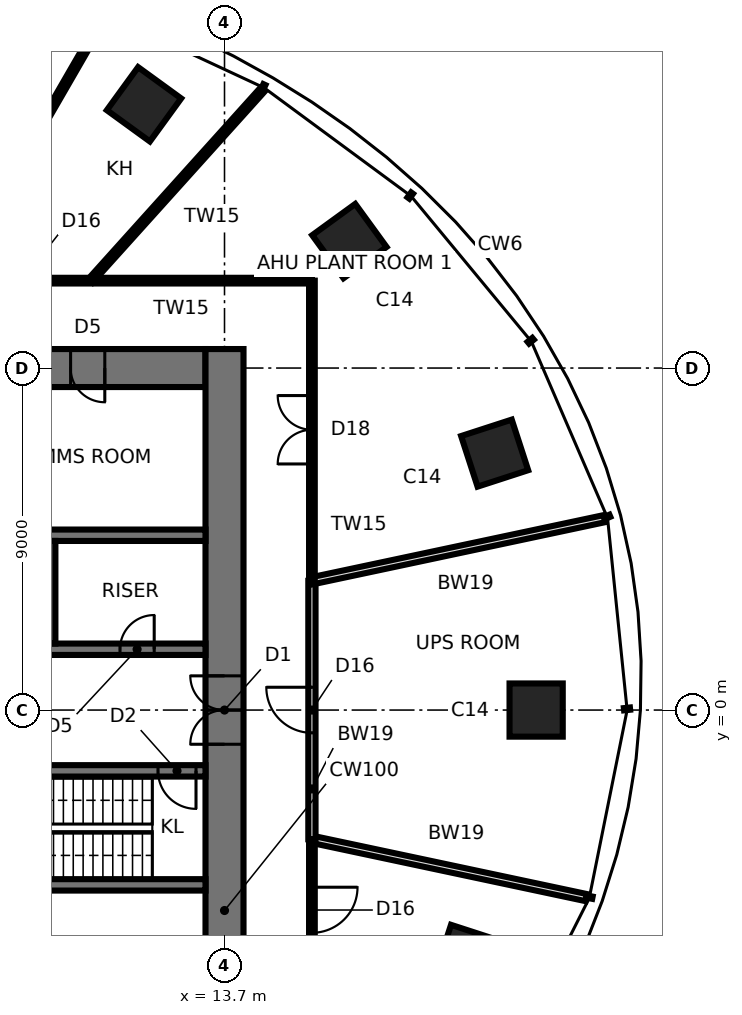
"""IFC4 building model, lengths in metres.
Left out: names, types, materials, properties, quantities, classifications, styles, units other than length and angle.
Written with IfcOpenShell. Run it as: python <this file> out.ifc"""

import sys

from ifc_helpers import new_model, si_unit, direction, frame, frame_2d, origin, origin_2d, place, context, subcontext, project, spatial, rectangle, extrude, element, fill, save


model = new_model("IFC4")
c1 = context("Model", 3, precision=1e-05, world=origin(), true_north=direction((0.0, 1.0)))
c2 = subcontext(c1, "Body", "Model", "MODEL_VIEW")
j1 = project(units=[si_unit("LENGTHUNIT", "METRE"), si_unit("PLANEANGLEUNIT", "RADIAN")], contexts=[c1])
p1 = place(None, origin())
s1 = spatial("IfcSite", under=j1, at=p1, CompositionType="ELEMENT")
p2 = place(p1, origin())
s2 = spatial("IfcBuilding", under=s1, at=p2, CompositionType="ELEMENT")
p3 = place(p2, frame((0.0, 0.0, 246.2)))
s3 = spatial("IfcBuildingStorey", under=s2, at=p3, CompositionType="ELEMENT", Elevation=246.2)
for number, where, z_axis, x_axis in (
    (1, (21.9, 0.0, 0.0), (0.0, 0.0, 1.0), (1.0, 0.0, 0.0)),
    (2, (20.808, 6.761, 0.0), (0.0, 0.0, 1.0), (0.951, 0.309, 0.0)),
    (3, (16.986, 12.341, 0.0), (0.0, 0.0, 1.0), (0.809, 0.588, 0.0)),
    (4, (11.581, 15.94, 0.0), (0.0, 0.0, 1.0), (0.588, 0.809, 0.0)),
    (5, (20.109, -6.534, 0.0), (0.0, 0.0, 1.0), (0.951, -0.309, 0.0)),
):
    element("IfcColumn", number, at=place(p3, frame(where, z_axis=z_axis, x_axis=x_axis)), inside=s3, PredefinedType="COLUMN", context=c2, shape_type="SweptSolid", body=[
        extrude(rectangle(XDim=1.4, YDim=1.4, at=origin_2d()), origin(), (0.0, 0.0, 1.0), 5.6),
    ])
p4 = place(p3, frame((13.2, 9.0, 0.0), z_axis=(0.0, 0.0, 1.0), x_axis=(-1.0, 0.0, 0.0)))
e6 = element("IfcWall", 6, at=p4, inside=s3, PredefinedType="SHEAR", context=c2, shape_type="SweptSolid", body=[
    extrude(rectangle(XDim=26.4, YDim=1.0, at=frame_2d((13.2, 0.0))), origin(), (0.0, 0.0, 1.0), 5.6),
])
p5 = place(p4, frame((2.65, 0.0, 0.0)))
e7 = element("IfcOpeningElement", 7, at=p5, cuts=e6, PredefinedType="OPENING", context=c2, shape_type="SweptSolid", body=[
    extrude(rectangle(XDim=0.9, YDim=2.1, at=frame_2d((0.45, 1.05))), frame((0.0, 0.51, 0.0), z_axis=(0.0, -1.0, 0.0), x_axis=(1.0, 0.0, 0.0)), (0.0, 0.0, 1.0), 1.02),
])
p6 = place(p4, frame((9.5, 0.0, 0.0)))
e8 = element("IfcOpeningElement", 8, at=p6, cuts=e6, PredefinedType="OPENING", context=c2, shape_type="SweptSolid", body=[
    extrude(rectangle(XDim=0.9, YDim=2.1, at=frame_2d((0.45, 1.05))), frame((0.0, 0.51, 0.0), z_axis=(0.0, -1.0, 0.0), x_axis=(1.0, 0.0, 0.0)), (0.0, 0.0, 1.0), 1.02),
])
p7 = place(p4, frame((16.0, 0.0, 0.0)))
e9 = element("IfcOpeningElement", 9, at=p7, cuts=e6, PredefinedType="OPENING", context=c2, shape_type="SweptSolid", body=[
    extrude(rectangle(XDim=0.9, YDim=2.1, at=frame_2d((0.45, 1.05))), frame((0.0, 0.51, 0.0), z_axis=(0.0, -1.0, 0.0), x_axis=(1.0, 0.0, 0.0)), (0.0, 0.0, 1.0), 1.02),
])
p8 = place(p4, frame((21.25, 0.0, 0.0)))
e10 = element("IfcOpeningElement", 10, at=p8, cuts=e6, PredefinedType="OPENING", context=c2, shape_type="SweptSolid", body=[
    extrude(rectangle(XDim=0.9, YDim=2.1, at=frame_2d((0.45, 1.05))), frame((0.0, 0.51, 0.0), z_axis=(0.0, -1.0, 0.0), x_axis=(1.0, 0.0, 0.0)), (0.0, 0.0, 1.0), 1.02),
])
p9 = place(p4, frame((24.8, 0.0, 0.0)))
e11 = element("IfcOpeningElement", 11, at=p9, cuts=e6, PredefinedType="OPENING", context=c2, shape_type="SweptSolid", body=[
    extrude(rectangle(XDim=1.0, YDim=2.1, at=frame_2d((0.5, 1.05))), frame((0.0, 0.51, 0.0), z_axis=(0.0, -1.0, 0.0), x_axis=(1.0, 0.0, 0.0)), (0.0, 0.0, 1.0), 1.02),
])
p10 = place(p3, frame((13.7, -9.5, 0.0), z_axis=(0.0, 0.0, 1.0), x_axis=(0.0, 1.0, 0.0)))
e12 = element("IfcWall", 12, at=p10, inside=s3, PredefinedType="SHEAR", context=c2, shape_type="SweptSolid", body=[
    extrude(rectangle(XDim=19.0, YDim=1.0, at=frame_2d((9.5, 0.0))), origin(), (0.0, 0.0, 1.0), 5.6),
])
p11 = place(p10, frame((8.6, 0.0, 0.0)))
e13 = element("IfcOpeningElement", 13, at=p11, cuts=e12, PredefinedType="OPENING", context=c2, shape_type="SweptSolid", body=[
    extrude(rectangle(XDim=1.8, YDim=2.4, at=frame_2d((0.9, 1.2))), frame((0.0, 0.51, 0.0), z_axis=(0.0, -1.0, 0.0), x_axis=(1.0, 0.0, 0.0)), (0.0, 0.0, 1.0), 1.02),
])
p12 = place(p3, frame((-13.2, 1.6, 0.0), z_axis=(0.0, 0.0, 1.0), x_axis=(1.0, 0.0, 0.0)))
e14 = element("IfcWall", 14, at=p12, inside=s3, PredefinedType="SHEAR", context=c2, shape_type="SweptSolid", body=[
    extrude(rectangle(XDim=26.4, YDim=0.3, at=frame_2d((13.2, 0.0))), origin(), (0.0, 0.0, 1.0), 5.6),
])
p13 = place(p12, frame((0.25, 0.0, 0.0)))
e15 = element("IfcOpeningElement", 15, at=p13, cuts=e14, PredefinedType="OPENING", context=c2, shape_type="SweptSolid", body=[
    extrude(rectangle(XDim=1.0, YDim=2.1, at=frame_2d((0.5, 1.05))), frame((0.0, 0.16, 0.0), z_axis=(0.0, -1.0, 0.0), x_axis=(1.0, 0.0, 0.0)), (0.0, 0.0, 1.0), 0.32),
])
p14 = place(p12, frame((20.25, 0.0, 0.0)))
e16 = element("IfcOpeningElement", 16, at=p14, cuts=e14, PredefinedType="OPENING", context=c2, shape_type="SweptSolid", body=[
    extrude(rectangle(XDim=1.5, YDim=2.4, at=frame_2d((0.75, 1.2))), frame((0.0, 0.16, 0.0), z_axis=(0.0, -1.0, 0.0), x_axis=(1.0, 0.0, 0.0)), (0.0, 0.0, 1.0), 0.32),
])
p15 = place(p12, frame((7.55, 0.0, 0.0)))
e17 = element("IfcOpeningElement", 17, at=p15, cuts=e14, PredefinedType="OPENING", context=c2, shape_type="SweptSolid", body=[
    extrude(rectangle(XDim=0.9, YDim=2.1, at=frame_2d((0.45, 1.05))), frame((0.0, 0.16, 0.0), z_axis=(0.0, -1.0, 0.0), x_axis=(1.0, 0.0, 0.0)), (0.0, 0.0, 1.0), 0.32),
])
p16 = place(p12, frame((10.15, 0.0, 0.0)))
e18 = element("IfcOpeningElement", 18, at=p16, cuts=e14, PredefinedType="OPENING", context=c2, shape_type="SweptSolid", body=[
    extrude(rectangle(XDim=0.9, YDim=2.1, at=frame_2d((0.45, 1.05))), frame((0.0, 0.16, 0.0), z_axis=(0.0, -1.0, 0.0), x_axis=(1.0, 0.0, 0.0)), (0.0, 0.0, 1.0), 0.32),
])
p17 = place(p12, frame((12.75, 0.0, 0.0)))
e19 = element("IfcOpeningElement", 19, at=p17, cuts=e14, PredefinedType="OPENING", context=c2, shape_type="SweptSolid", body=[
    extrude(rectangle(XDim=0.9, YDim=2.1, at=frame_2d((0.45, 1.05))), frame((0.0, 0.16, 0.0), z_axis=(0.0, -1.0, 0.0), x_axis=(1.0, 0.0, 0.0)), (0.0, 0.0, 1.0), 0.32),
])
p18 = place(p12, frame((24.15, 0.0, 0.0)))
e20 = element("IfcOpeningElement", 20, at=p18, cuts=e14, PredefinedType="OPENING", context=c2, shape_type="SweptSolid", body=[
    extrude(rectangle(XDim=0.9, YDim=2.1, at=frame_2d((0.45, 1.05))), frame((0.0, 0.16, 0.0), z_axis=(0.0, -1.0, 0.0), x_axis=(1.0, 0.0, 0.0)), (0.0, 0.0, 1.0), 0.32),
])
p19 = place(p3, frame((-13.2, -1.6, 0.0), z_axis=(0.0, 0.0, 1.0), x_axis=(1.0, 0.0, 0.0)))
e21 = element("IfcWall", 21, at=p19, inside=s3, PredefinedType="SHEAR", context=c2, shape_type="SweptSolid", body=[
    extrude(rectangle(XDim=26.4, YDim=0.3, at=frame_2d((13.2, 0.0))), origin(), (0.0, 0.0, 1.0), 5.6),
])
p20 = place(p19, frame((25.15, 0.0, 0.0)))
e22 = element("IfcOpeningElement", 22, at=p20, cuts=e21, PredefinedType="OPENING", context=c2, shape_type="SweptSolid", body=[
    extrude(rectangle(XDim=1.0, YDim=2.1, at=frame_2d((0.5, 1.05))), frame((0.0, 0.16, 0.0), z_axis=(0.0, -1.0, 0.0), x_axis=(1.0, 0.0, 0.0)), (0.0, 0.0, 1.0), 0.32),
])
p21 = place(p19, frame((7.55, 0.0, 0.0)))
e23 = element("IfcOpeningElement", 23, at=p21, cuts=e21, PredefinedType="OPENING", context=c2, shape_type="SweptSolid", body=[
    extrude(rectangle(XDim=0.9, YDim=2.1, at=frame_2d((0.45, 1.05))), frame((0.0, 0.16, 0.0), z_axis=(0.0, -1.0, 0.0), x_axis=(1.0, 0.0, 0.0)), (0.0, 0.0, 1.0), 0.32),
])
p22 = place(p19, frame((10.15, 0.0, 0.0)))
e24 = element("IfcOpeningElement", 24, at=p22, cuts=e21, PredefinedType="OPENING", context=c2, shape_type="SweptSolid", body=[
    extrude(rectangle(XDim=0.9, YDim=2.1, at=frame_2d((0.45, 1.05))), frame((0.0, 0.16, 0.0), z_axis=(0.0, -1.0, 0.0), x_axis=(1.0, 0.0, 0.0)), (0.0, 0.0, 1.0), 0.32),
])
p23 = place(p19, frame((12.75, 0.0, 0.0)))
e25 = element("IfcOpeningElement", 25, at=p23, cuts=e21, PredefinedType="OPENING", context=c2, shape_type="SweptSolid", body=[
    extrude(rectangle(XDim=0.9, YDim=2.1, at=frame_2d((0.45, 1.05))), frame((0.0, 0.16, 0.0), z_axis=(0.0, -1.0, 0.0), x_axis=(1.0, 0.0, 0.0)), (0.0, 0.0, 1.0), 0.32),
])
p24 = place(p19, frame((15.25, 0.0, 0.0)))
e26 = element("IfcOpeningElement", 26, at=p24, cuts=e21, PredefinedType="OPENING", context=c2, shape_type="SweptSolid", body=[
    extrude(rectangle(XDim=1.1, YDim=2.3, at=frame_2d((0.55, 1.15))), frame((0.0, 0.16, 0.0), z_axis=(0.0, -1.0, 0.0), x_axis=(1.0, 0.0, 0.0)), (0.0, 0.0, 1.0), 0.32),
])
p25 = place(p19, frame((17.85, 0.0, 0.0)))
e27 = element("IfcOpeningElement", 27, at=p25, cuts=e21, PredefinedType="OPENING", context=c2, shape_type="SweptSolid", body=[
    extrude(rectangle(XDim=1.1, YDim=2.3, at=frame_2d((0.55, 1.15))), frame((0.0, 0.16, 0.0), z_axis=(0.0, -1.0, 0.0), x_axis=(1.0, 0.0, 0.0)), (0.0, 0.0, 1.0), 0.32),
])
p26 = place(p19, frame((5.55, 0.0, 0.0)))
e28 = element("IfcOpeningElement", 28, at=p26, cuts=e21, PredefinedType="OPENING", context=c2, shape_type="SweptSolid", body=[
    extrude(rectangle(XDim=0.9, YDim=2.1, at=frame_2d((0.45, 1.05))), frame((0.0, 0.16, 0.0), z_axis=(0.0, -1.0, 0.0), x_axis=(1.0, 0.0, 0.0)), (0.0, 0.0, 1.0), 0.32),
])
for number, where, z_axis, x_axis in (
    (29, (-13.2, 4.6, 0.0), (0.0, 0.0, 1.0), (1.0, 0.0, 0.0)),
    (30, (-13.2, -4.6, 0.0), (0.0, 0.0, 1.0), (1.0, 0.0, 0.0)),
):
    element("IfcWall", number, at=place(p3, frame(where, z_axis=z_axis, x_axis=x_axis)), inside=s3, PredefinedType="SHEAR", context=c2, shape_type="SweptSolid", body=[
        extrude(rectangle(XDim=26.4, YDim=0.3, at=frame_2d((13.2, 0.0))), origin(), (0.0, 0.0, 1.0), 5.6),
    ])
p27 = place(p3, frame((9.1, 1.75, 0.0), z_axis=(0.0, 0.0, 1.0), x_axis=(0.0, 1.0, 0.0)))
e31 = element("IfcWall", 31, at=p27, inside=s3, PredefinedType="SHEAR", context=c2, shape_type="SweptSolid", body=[
    extrude(rectangle(XDim=2.7, YDim=0.3, at=frame_2d((1.35, 0.0))), origin(), (0.0, 0.0, 1.0), 5.6),
])
p28 = place(p3, frame((16.0, -11.3, 0.0), z_axis=(0.0, 0.0, 1.0), x_axis=(0.0, 1.0, 0.0)))
e32 = element("IfcWall", 32, at=p28, inside=s3, PredefinedType="PARTITIONING", context=c2, shape_type="SweptSolid", body=[
    extrude(rectangle(XDim=7.899, YDim=0.15, at=frame_2d((3.95, 0.0))), origin(), (0.0, 0.0, 1.0), 5.4),
])
p29 = place(p28, frame((5.438, 0.0, 0.0)))
e33 = element("IfcOpeningElement", 33, at=p29, cuts=e32, PredefinedType="OPENING", context=c2, shape_type="SweptSolid", body=[
    extrude(rectangle(XDim=1.2, YDim=2.1, at=frame_2d((0.6, 1.05))), frame((0.0, 0.085, 0.0), z_axis=(0.0, -1.0, 0.0), x_axis=(1.0, 0.0, 0.0)), (0.0, 0.0, 1.0), 0.17),
])
p30 = place(p3, frame((16.0, -3.401, 0.0), z_axis=(0.0, 0.0, 1.0), x_axis=(0.978142451548, -0.207935914357, 0.0)))
e34 = element("IfcWall", 34, at=p30, inside=s3, PredefinedType="SOLIDWALL", context=c2, shape_type="SweptSolid", body=[
    extrude(rectangle(XDim=7.379, YDim=0.19, at=frame_2d((3.69, 0.0))), origin(), (0.0, 0.0, 1.0), 5.4),
])
p31 = place(p3, frame((16.0, -3.401, 0.0), z_axis=(0.0, 0.0, 1.0), x_axis=(0.0, 1.0, 0.0)))
e35 = element("IfcWall", 35, at=p31, inside=s3, PredefinedType="SOLIDWALL", context=c2, shape_type="SweptSolid", body=[
    extrude(rectangle(XDim=6.802, YDim=0.19, at=frame_2d((3.401, 0.0))), origin(), (0.0, 0.0, 1.0), 5.4),
])
p32 = place(p31, frame((2.801, 0.0, 0.0)))
e36 = element("IfcOpeningElement", 36, at=p32, cuts=e35, PredefinedType="OPENING", context=c2, shape_type="SweptSolid", body=[
    extrude(rectangle(XDim=1.2, YDim=2.1, at=frame_2d((0.6, 1.05))), frame((0.0, 0.105, 0.0), z_axis=(0.0, -1.0, 0.0), x_axis=(1.0, 0.0, 0.0)), (0.0, 0.0, 1.0), 0.21),
])
p33 = place(p3, frame((23.7, 5.038, 0.0), z_axis=(0.0, 0.0, 1.0), x_axis=(-0.97814915542, -0.20790437646, 0.0)))
e37 = element("IfcWall", 37, at=p33, inside=s3, PredefinedType="SOLIDWALL", context=c2, shape_type="SweptSolid", body=[
    extrude(rectangle(XDim=7.873, YDim=0.19, at=frame_2d((3.936, 0.0))), origin(), (0.0, 0.0, 1.0), 5.4),
])
p34 = place(p3, frame((16.0, 3.401, 0.0), z_axis=(0.0, 0.0, 1.0), x_axis=(0.0, 1.0, 0.0)))
e38 = element("IfcWall", 38, at=p34, inside=s3, PredefinedType="PARTITIONING", context=c2, shape_type="SweptSolid", body=[
    extrude(rectangle(XDim=7.899, YDim=0.15, at=frame_2d((3.95, 0.0))), origin(), (0.0, 0.0, 1.0), 5.4),
])
p35 = place(p34, frame((3.075, 0.0, 0.0)))
e39 = element("IfcOpeningElement", 39, at=p35, cuts=e38, PredefinedType="OPENING", context=c2, shape_type="SweptSolid", body=[
    extrude(rectangle(XDim=1.8, YDim=2.4, at=frame_2d((0.9, 1.2))), frame((0.0, 0.085, 0.0), z_axis=(0.0, -1.0, 0.0), x_axis=(1.0, 0.0, 0.0)), (0.0, 0.0, 1.0), 0.17),
])
p36 = place(p3, frame((10.175, 11.3, 0.0), z_axis=(0.0, 0.0, 1.0), x_axis=(0.669122640064, 0.743151998284, 0.0)))
e40 = element("IfcWall", 40, at=p36, inside=s3, PredefinedType="PARTITIONING", context=c2, shape_type="SweptSolid", body=[
    extrude(rectangle(XDim=6.748, YDim=0.15, at=frame_2d((3.374, 0.0))), origin(), (0.0, 0.0, 1.0), 5.4),
])
p37 = place(p3, frame((6.524, 11.3, 0.0), z_axis=(0.0, 0.0, 1.0), x_axis=(0.499985955615, 0.866033512162, 0.0)))
e41 = element("IfcWall", 41, at=p37, inside=s3, PredefinedType="PARTITIONING", context=c2, shape_type="SweptSolid", body=[
    extrude(rectangle(XDim=8.02, YDim=0.15, at=frame_2d((4.01, 0.0))), origin(), (0.0, 0.0, 1.0), 5.4),
])
p38 = place(p3, frame((16.0, 11.3, 0.0), z_axis=(0.0, 0.0, 1.0), x_axis=(-1.0, 0.0, 0.0)))
e42 = element("IfcWall", 42, at=p38, inside=s3, PredefinedType="PARTITIONING", context=c2, shape_type="SweptSolid", body=[
    extrude(rectangle(XDim=32.0, YDim=0.15, at=frame_2d((16.0, 0.0))), origin(), (0.0, 0.0, 1.0), 5.4),
])
p39 = place(p38, frame((7.026, 0.0, 0.0)))
e43 = element("IfcOpeningElement", 43, at=p39, cuts=e42, PredefinedType="OPENING", context=c2, shape_type="SweptSolid", body=[
    extrude(rectangle(XDim=1.2, YDim=2.1, at=frame_2d((0.6, 1.05))), frame((0.0, 0.085, 0.0), z_axis=(0.0, -1.0, 0.0), x_axis=(1.0, 0.0, 0.0)), (0.0, 0.0, 1.0), 0.17),
])
p40 = place(p38, frame((12.432, 0.0, 0.0)))
e44 = element("IfcOpeningElement", 44, at=p40, cuts=e42, PredefinedType="OPENING", context=c2, shape_type="SweptSolid", body=[
    extrude(rectangle(XDim=1.8, YDim=2.4, at=frame_2d((0.9, 1.2))), frame((0.0, 0.085, 0.0), z_axis=(0.0, -1.0, 0.0), x_axis=(1.0, 0.0, 0.0)), (0.0, 0.0, 1.0), 0.17),
])
p41 = place(p38, frame((19.256, 0.0, 0.0)))
e45 = element("IfcOpeningElement", 45, at=p41, cuts=e42, PredefinedType="OPENING", context=c2, shape_type="SweptSolid", body=[
    extrude(rectangle(XDim=1.2, YDim=2.1, at=frame_2d((0.6, 1.05))), frame((0.0, 0.085, 0.0), z_axis=(0.0, -1.0, 0.0), x_axis=(1.0, 0.0, 0.0)), (0.0, 0.0, 1.0), 0.17),
])
p42 = place(p38, frame((26.387, 0.0, 0.0)))
e46 = element("IfcOpeningElement", 46, at=p42, cuts=e42, PredefinedType="OPENING", context=c2, shape_type="SweptSolid", body=[
    extrude(rectangle(XDim=1.8, YDim=2.4, at=frame_2d((0.9, 1.2))), frame((0.0, 0.085, 0.0), z_axis=(0.0, -1.0, 0.0), x_axis=(1.0, 0.0, 0.0)), (0.0, 0.0, 1.0), 0.17),
])
p43 = place(p11, origin())
e47 = element("IfcDoor", 47, at=p43, inside=s3, OperationType="DOUBLE_DOOR_SINGLE_SWING", PredefinedType="DOOR", context=c2, shape_type="SweptSolid", body=[
    extrude(rectangle(XDim=1.72, YDim=2.36, at=frame_2d((0.9, 1.18))), frame((0.0, 0.025, 0.0), z_axis=(0.0, -1.0, 0.0), x_axis=(1.0, 0.0, 0.0)), (0.0, 0.0, 1.0), 0.05),
    extrude(rectangle(XDim=0.04, YDim=2.4, at=frame_2d((0.02, 1.2))), frame((0.0, 0.25, 0.0), z_axis=(0.0, -1.0, 0.0), x_axis=(1.0, 0.0, 0.0)), (0.0, 0.0, 1.0), 0.5),
    extrude(rectangle(XDim=0.04, YDim=2.4, at=frame_2d((1.78, 1.2))), frame((0.0, 0.25, 0.0), z_axis=(0.0, -1.0, 0.0), x_axis=(1.0, 0.0, 0.0)), (0.0, 0.0, 1.0), 0.5),
    extrude(rectangle(XDim=1.72, YDim=0.04, at=frame_2d((0.9, 2.38))), frame((0.0, 0.25, 0.0), z_axis=(0.0, -1.0, 0.0), x_axis=(1.0, 0.0, 0.0)), (0.0, 0.0, 1.0), 0.5),
])
fill(e13, e47)
p44 = place(p20, frame((1.0, 0.0, 0.0), z_axis=(0.0, 0.0, 1.0), x_axis=(-1.0, 0.0, 0.0)))
e48 = element("IfcDoor", 48, at=p44, inside=s3, OperationType="SINGLE_SWING_LEFT", PredefinedType="DOOR", context=c2, shape_type="SweptSolid", body=[
    extrude(rectangle(XDim=1.0, YDim=2.1, at=frame_2d((0.5, 1.05))), frame((0.0, 0.025, 0.0), z_axis=(0.0, -1.0, 0.0), x_axis=(1.0, 0.0, 0.0)), (0.0, 0.0, 1.0), 0.05),
])
fill(e22, e48)
p45 = place(p18, origin())
e49 = element("IfcDoor", 49, at=p45, inside=s3, OperationType="SINGLE_SWING_RIGHT", PredefinedType="DOOR", context=c2, shape_type="SweptSolid", body=[
    extrude(rectangle(XDim=0.9, YDim=2.1, at=frame_2d((0.45, 1.05))), frame((0.0, 0.025, 0.0), z_axis=(0.0, -1.0, 0.0), x_axis=(1.0, 0.0, 0.0)), (0.0, 0.0, 1.0), 0.05),
])
fill(e20, e49)
p46 = place(p5, origin())
e50 = element("IfcDoor", 50, at=p46, inside=s3, OperationType="SINGLE_SWING_LEFT", PredefinedType="DOOR", context=c2, shape_type="SweptSolid", body=[
    extrude(rectangle(XDim=0.82, YDim=2.06, at=frame_2d((0.45, 1.03))), frame((0.0, 0.025, 0.0), z_axis=(0.0, -1.0, 0.0), x_axis=(1.0, 0.0, 0.0)), (0.0, 0.0, 1.0), 0.05),
    extrude(rectangle(XDim=0.04, YDim=2.1, at=frame_2d((0.02, 1.05))), frame((0.0, 0.25, 0.0), z_axis=(0.0, -1.0, 0.0), x_axis=(1.0, 0.0, 0.0)), (0.0, 0.0, 1.0), 0.5),
    extrude(rectangle(XDim=0.04, YDim=2.1, at=frame_2d((0.88, 1.05))), frame((0.0, 0.25, 0.0), z_axis=(0.0, -1.0, 0.0), x_axis=(1.0, 0.0, 0.0)), (0.0, 0.0, 1.0), 0.5),
    extrude(rectangle(XDim=0.82, YDim=0.04, at=frame_2d((0.45, 2.08))), frame((0.0, 0.25, 0.0), z_axis=(0.0, -1.0, 0.0), x_axis=(1.0, 0.0, 0.0)), (0.0, 0.0, 1.0), 0.5),
])
fill(e7, e50)
p47 = place(p35, origin())
e51 = element("IfcDoor", 51, at=p47, inside=s3, OperationType="DOUBLE_DOOR_SINGLE_SWING", PredefinedType="DOOR", context=c2, shape_type="SweptSolid", body=[
    extrude(rectangle(XDim=1.8, YDim=2.4, at=frame_2d((0.9, 1.2))), frame((0.0, 0.025, 0.0), z_axis=(0.0, -1.0, 0.0), x_axis=(1.0, 0.0, 0.0)), (0.0, 0.0, 1.0), 0.05),
])
fill(e39, e51)
p48 = place(p29, frame((1.2, 0.0, 0.0), z_axis=(0.0, 0.0, 1.0), x_axis=(-1.0, 0.0, 0.0)))
e52 = element("IfcDoor", 52, at=p48, inside=s3, OperationType="SINGLE_SWING_LEFT", PredefinedType="DOOR", context=c2, shape_type="SweptSolid", body=[
    extrude(rectangle(XDim=1.2, YDim=2.1, at=frame_2d((0.6, 1.05))), frame((0.0, 0.025, 0.0), z_axis=(0.0, -1.0, 0.0), x_axis=(1.0, 0.0, 0.0)), (0.0, 0.0, 1.0), 0.05),
])
fill(e33, e52)
p49 = place(p32, origin())
e53 = element("IfcDoor", 53, at=p49, inside=s3, OperationType="SINGLE_SWING_RIGHT", PredefinedType="DOOR", context=c2, shape_type="SweptSolid", body=[
    extrude(rectangle(XDim=1.2, YDim=2.1, at=frame_2d((0.6, 1.05))), frame((0.0, 0.025, 0.0), z_axis=(0.0, -1.0, 0.0), x_axis=(1.0, 0.0, 0.0)), (0.0, 0.0, 1.0), 0.05),
])
fill(e36, e53)
save(model, sys.argv[1])
